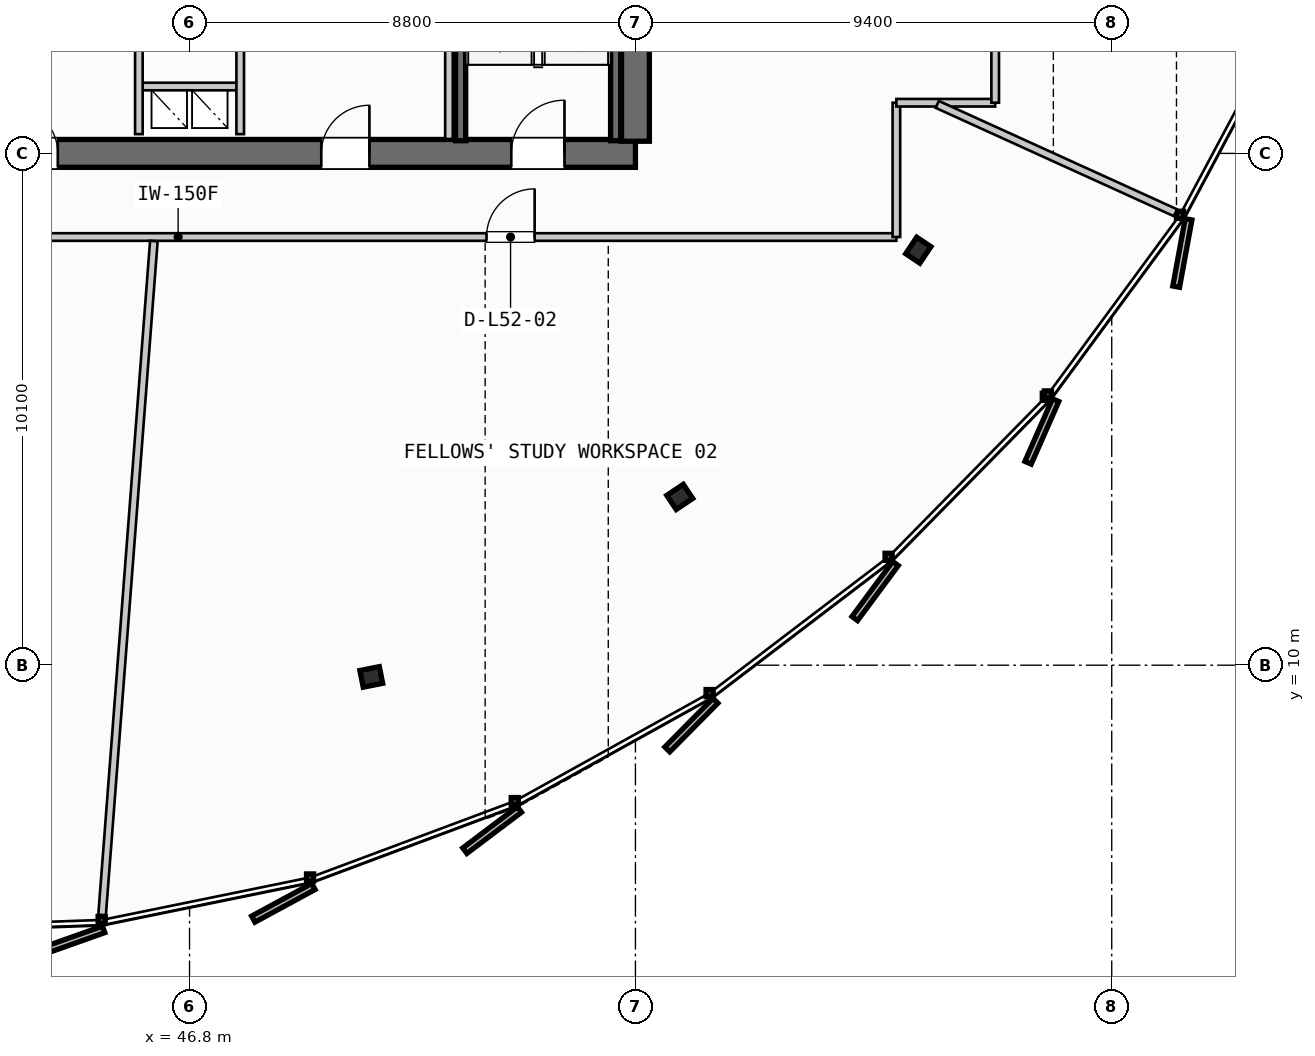
"""IFC4 building model, lengths in metres.
Left out: names, types, materials, properties, quantities, classifications, styles, units other than length and angle.
Written with IfcOpenShell. Run it as: python <this file> out.ifc"""

import sys

from ifc_helpers import new_model, si_unit, direction, frame, frame_2d, origin, origin_2d, place, context, subcontext, project, spatial, rectangle, i_section, extrude, source, transform, mapped, element, fill, save


model = new_model("IFC4")
c1 = context("Model", 3, precision=1e-05, world=origin(), true_north=direction((0.0, 1.0)))
c2 = subcontext(c1, "Body", "Model", "MODEL_VIEW")
j1 = project(units=[si_unit("LENGTHUNIT", "METRE"), si_unit("PLANEANGLEUNIT", "RADIAN")], contexts=[c1])
p1 = place(None, origin())
s1 = spatial("IfcSite", under=j1, at=p1, CompositionType="ELEMENT")
p2 = place(p1, origin())
s2 = spatial("IfcBuilding", under=s1, at=p2, CompositionType="ELEMENT")
p3 = place(p2, frame((0.0, 0.0, 200.9)))
s3 = spatial("IfcBuildingStorey", under=s2, at=p3, CompositionType="ELEMENT", Elevation=200.9)
p4 = place(p3, frame((38.0, 20.1, 0.0), z_axis=(0.0, 0.0, 1.0), x_axis=(1.0, 0.0, 0.0)))
e1 = element("IfcWall", 1, at=p4, inside=s3, PredefinedType="SHEAR", context=c2, shape_type="SweptSolid", body=[
    extrude(rectangle(XDim=17.6, YDim=0.55, at=frame_2d((8.8, 0.0))), origin(), (0.0, 0.0, 1.0), 3.26),
])
p5 = place(p4, frame((1.4, 0.0, 0.0)))
e2 = element("IfcOpeningElement", 2, at=p5, cuts=e1, PredefinedType="OPENING", context=c2, shape_type="SweptSolid", body=[
    extrude(rectangle(XDim=1.05, YDim=2.15, at=frame_2d((0.525, 1.075))), frame((0.0, 0.285, 0.0), z_axis=(0.0, -1.0, 0.0), x_axis=(1.0, 0.0, 0.0)), (0.0, 0.0, 1.0), 0.57),
])
p6 = place(p4, frame((15.15, 0.0, 0.0)))
e3 = element("IfcOpeningElement", 3, at=p6, cuts=e1, PredefinedType="OPENING", context=c2, shape_type="SweptSolid", body=[
    extrude(rectangle(XDim=1.05, YDim=2.15, at=frame_2d((0.525, 1.075))), frame((0.0, 0.285, 0.0), z_axis=(0.0, -1.0, 0.0), x_axis=(1.0, 0.0, 0.0)), (0.0, 0.0, 1.0), 0.57),
])
p7 = place(p4, frame((5.25, 0.0, 0.0)))
e4 = element("IfcOpeningElement", 4, at=p7, cuts=e1, PredefinedType="OPENING", context=c2, shape_type="SweptSolid", body=[
    extrude(rectangle(XDim=0.95, YDim=2.15, at=frame_2d((0.475, 1.075))), frame((0.0, 0.285, 0.0), z_axis=(0.0, -1.0, 0.0), x_axis=(1.0, 0.0, 0.0)), (0.0, 0.0, 1.0), 0.57),
])
p8 = place(p4, frame((11.4, 0.0, 0.0)))
e5 = element("IfcOpeningElement", 5, at=p8, cuts=e1, PredefinedType="OPENING", context=c2, shape_type="SweptSolid", body=[
    extrude(rectangle(XDim=0.95, YDim=2.15, at=frame_2d((0.475, 1.075))), frame((0.0, 0.285, 0.0), z_axis=(0.0, -1.0, 0.0), x_axis=(1.0, 0.0, 0.0)), (0.0, 0.0, 1.0), 0.57),
])
p9 = place(p3, frame((55.6, 20.34, 0.0), z_axis=(0.0, 0.0, 1.0), x_axis=(0.0, 1.0, 0.0)))
e6 = element("IfcWall", 6, at=p9, inside=s3, PredefinedType="SHEAR", context=c2, shape_type="SweptSolid", body=[
    extrude(rectangle(XDim=14.92, YDim=0.55, at=frame_2d((7.46, 0.0))), origin(), (0.0, 0.0, 1.0), 3.26),
])
p10 = place(p9, frame((12.71, 0.0, 0.0)))
e7 = element("IfcOpeningElement", 7, at=p10, cuts=e6, PredefinedType="OPENING", context=c2, shape_type="SweptSolid", body=[
    extrude(rectangle(XDim=1.05, YDim=2.15, at=frame_2d((0.525, 1.075))), frame((0.0, 0.285, 0.0), z_axis=(0.0, -1.0, 0.0), x_axis=(1.0, 0.0, 0.0)), (0.0, 0.0, 1.0), 0.57),
])
p11 = place(p9, frame((8.61, 0.0, 0.0)))
e8 = element("IfcOpeningElement", 8, at=p11, cuts=e6, PredefinedType="OPENING", context=c2, shape_type="SweptSolid", body=[
    extrude(rectangle(XDim=1.1, YDim=2.2, at=frame_2d((0.55, 1.1))), frame((0.0, 0.285, 0.0), z_axis=(0.0, -1.0, 0.0), x_axis=(1.0, 0.0, 0.0)), (0.0, 0.0, 1.0), 0.57),
])
m1 = source(origin(), c2, "Body", "SweptSolid", [
    extrude(i_section(OverallWidth=0.391, OverallDepth=0.335, WebThickness=0.023, FlangeThickness=0.034, FilletRadius=0.015, at=origin_2d()), origin(), (0.0, 0.0, 1.0), 3.26),
])
for number, where, z_axis, x_axis in (
    (9, (50.387, 9.769, 0.0), (0.0, 0.0, 1.0), (0.195, -0.981, 0.0)),
    (10, (56.475, 13.321, 0.0), (0.0, 0.0, 1.0), (0.556, -0.831, 0.0)),
    (11, (61.183, 18.19, 0.0), (0.0, 0.0, 1.0), (0.831, -0.556, 0.0)),
):
    element("IfcColumn", number, at=place(p3, frame(where, z_axis=z_axis, x_axis=x_axis)), inside=s3, PredefinedType="COLUMN", context=c2, shape_type="MappedRepresentation", body=[
        mapped(m1, transform((0.0, 0.0, 0.0), scale=1.0)),
    ])
for number, where, z_axis, x_axis in (
    (12, (55.21, 27.7, 0.0), (0.0, 0.0, 1.0), (0.0, -1.0, 0.0)),
    (13, (52.15, 20.35, 0.0), (0.0, 0.0, 1.0), (0.0, 1.0, 0.0)),
):
    element("IfcWall", number, at=place(p3, frame(where, z_axis=z_axis, x_axis=x_axis)), inside=s3, PredefinedType="SHEAR", context=c2, shape_type="SweptSolid", body=[
        extrude(rectangle(XDim=7.35, YDim=0.2, at=frame_2d((3.675, 0.0))), origin(), (0.0, 0.0, 1.0), 3.26),
    ])
p12 = place(p3, frame((45.8, 21.42, 0.0), z_axis=(0.0, 0.0, 1.0), x_axis=(1.0, 0.0, 0.0)))
e14 = element("IfcWall", 14, at=p12, inside=s3, PredefinedType="PARTITIONING", context=c2, shape_type="SweptSolid", body=[
    extrude(rectangle(XDim=2.0, YDim=0.15, at=frame_2d((1.0, 0.0))), origin(), (0.0, 0.0, 1.0), 2.595),
])
for number, where, z_axis, x_axis in (
    (15, (45.8, 20.48, 0.0), (0.0, 0.0, 1.0), (0.0, 1.0, 0.0)),
    (16, (47.8, 20.48, 0.0), (0.0, 0.0, 1.0), (0.0, 1.0, 0.0)),
):
    element("IfcWall", number, at=place(p3, frame(where, z_axis=z_axis, x_axis=x_axis)), inside=s3, PredefinedType="PARTITIONING", context=c2, shape_type="SweptSolid", body=[
        extrude(rectangle(XDim=2.24, YDim=0.15, at=frame_2d((1.12, 0.0))), origin(), (0.0, 0.0, 1.0), 2.595),
    ])
p13 = place(p3, frame((51.92, 20.385, 0.0), z_axis=(0.0, 0.0, 1.0), x_axis=(0.0, 1.0, 0.0)))
e17 = element("IfcWall", 17, at=p13, inside=s3, PredefinedType="PARTITIONING", context=c2, shape_type="SweptSolid", body=[
    extrude(rectangle(XDim=2.345, YDim=0.15, at=frame_2d((1.172, 0.0))), origin(), (0.0, 0.0, 1.0), 2.595),
])
p14 = place(p3, frame((32.4, 18.45, 0.0), z_axis=(0.0, 0.0, 1.0), x_axis=(1.0, 0.0, 0.0)))
e18 = element("IfcWall", 18, at=p14, inside=s3, PredefinedType="PARTITIONING", context=c2, shape_type="SweptSolid", body=[
    extrude(rectangle(XDim=28.35, YDim=0.15, at=frame_2d((14.175, 0.0))), origin(), (0.0, 0.0, 1.0), 2.595),
])
p15 = place(p14, frame((8.202, 0.0, 0.0)))
e19 = element("IfcOpeningElement", 19, at=p15, cuts=e18, PredefinedType="OPENING", context=c2, shape_type="SweptSolid", body=[
    extrude(rectangle(XDim=0.95, YDim=2.15, at=frame_2d((0.475, 1.075))), frame((0.0, 0.085, 0.0), z_axis=(0.0, -1.0, 0.0), x_axis=(1.0, 0.0, 0.0)), (0.0, 0.0, 1.0), 0.17),
])
p16 = place(p14, frame((20.261, 0.0, 0.0)))
e20 = element("IfcOpeningElement", 20, at=p16, cuts=e18, PredefinedType="OPENING", context=c2, shape_type="SweptSolid", body=[
    extrude(rectangle(XDim=0.95, YDim=2.15, at=frame_2d((0.475, 1.075))), frame((0.0, 0.085, 0.0), z_axis=(0.0, -1.0, 0.0), x_axis=(1.0, 0.0, 0.0)), (0.0, 0.0, 1.0), 0.17),
])
p17 = place(p3, frame((60.75, 18.45, 0.0), z_axis=(0.0, 0.0, 1.0), x_axis=(0.0, 1.0, 0.0)))
e21 = element("IfcWall", 21, at=p17, inside=s3, PredefinedType="PARTITIONING", context=c2, shape_type="SweptSolid", body=[
    extrude(rectangle(XDim=2.65, YDim=0.15, at=frame_2d((1.325, 0.0))), origin(), (0.0, 0.0, 1.0), 2.595),
])
p18 = place(p3, frame((60.75, 21.1, 0.0), z_axis=(0.0, 0.0, 1.0), x_axis=(1.0, 0.0, 0.0)))
e22 = element("IfcWall", 22, at=p18, inside=s3, PredefinedType="PARTITIONING", context=c2, shape_type="SweptSolid", body=[
    extrude(rectangle(XDim=1.95, YDim=0.15, at=frame_2d((0.975, 0.0))), origin(), (0.0, 0.0, 1.0), 2.595),
])
p19 = place(p3, frame((62.7, 21.1, 0.0), z_axis=(0.0, 0.0, 1.0), x_axis=(0.0, 1.0, 0.0)))
e23 = element("IfcWall", 23, at=p19, inside=s3, PredefinedType="PARTITIONING", context=c2, shape_type="SweptSolid", body=[
    extrude(rectangle(XDim=1.7, YDim=0.15, at=frame_2d((0.85, 0.0))), origin(), (0.0, 0.0, 1.0), 2.595),
])
p20 = place(p3, frame((46.096, 18.37, 0.0), z_axis=(0.0, 0.0, 1.0), x_axis=(-0.076623710355, -0.997060081947, 0.0)))
e24 = element("IfcWall", 24, at=p20, inside=s3, PredefinedType="PARTITIONING", context=c2, shape_type="SweptSolid", body=[
    extrude(rectangle(XDim=13.338, YDim=0.15, at=frame_2d((6.669, 0.0))), origin(), (0.0, 0.0, 1.0), 2.595),
])
p21 = place(p3, frame((61.556, 21.067, 0.0), z_axis=(0.0, 0.0, 1.0), x_axis=(0.910308185416, -0.413931162833, 0.0)))
e25 = element("IfcWall", 25, at=p21, inside=s3, PredefinedType="PARTITIONING", context=c2, shape_type="SweptSolid", body=[
    extrude(rectangle(XDim=5.164, YDim=0.15, at=frame_2d((2.582, 0.0))), origin(), (0.0, 0.0, 1.0), 2.595),
])
m2 = source(origin(), c2, "Body", "SweptSolid", [
    extrude(rectangle(XDim=1.05, YDim=2.15, at=frame_2d((0.525, 1.075))), frame((0.0, 0.025, 0.0), z_axis=(0.0, -1.0, 0.0), x_axis=(1.0, 0.0, 0.0)), (0.0, 0.0, 1.0), 0.05),
])
p22 = place(p6, origin())
e26 = element("IfcDoor", 26, at=p22, inside=s3, OperationType="SINGLE_SWING_RIGHT", PredefinedType="DOOR", context=c2, shape_type="MappedRepresentation", body=[
    mapped(m2, transform((0.0, 0.0, 0.0), scale=1.0)),
])
fill(e3, e26)
m3 = source(origin(), c2, "Body", "SweptSolid", [
    extrude(rectangle(XDim=0.95, YDim=2.15, at=frame_2d((0.475, 1.075))), frame((0.0, 0.025, 0.0), z_axis=(0.0, -1.0, 0.0), x_axis=(1.0, 0.0, 0.0)), (0.0, 0.0, 1.0), 0.05),
])
p23 = place(p7, origin())
e27 = element("IfcDoor", 27, at=p23, inside=s3, OperationType="SINGLE_SWING_LEFT", PredefinedType="DOOR", context=c2, shape_type="MappedRepresentation", body=[
    mapped(m3, transform((0.0, 0.0, 0.0), scale=1.0)),
])
fill(e4, e27)
p24 = place(p8, origin())
e28 = element("IfcDoor", 28, at=p24, inside=s3, OperationType="SINGLE_SWING_RIGHT", PredefinedType="DOOR", context=c2, shape_type="MappedRepresentation", body=[
    mapped(m3, transform((0.0, 0.0, 0.0), scale=1.0)),
])
fill(e5, e28)
p25 = place(p16, origin())
e29 = element("IfcDoor", 29, at=p25, inside=s3, OperationType="SINGLE_SWING_RIGHT", PredefinedType="DOOR", context=c2, shape_type="MappedRepresentation", body=[
    mapped(m3, transform((0.0, 0.0, 0.0), scale=1.0)),
])
fill(e20, e29)
save(model, sys.argv[1])
